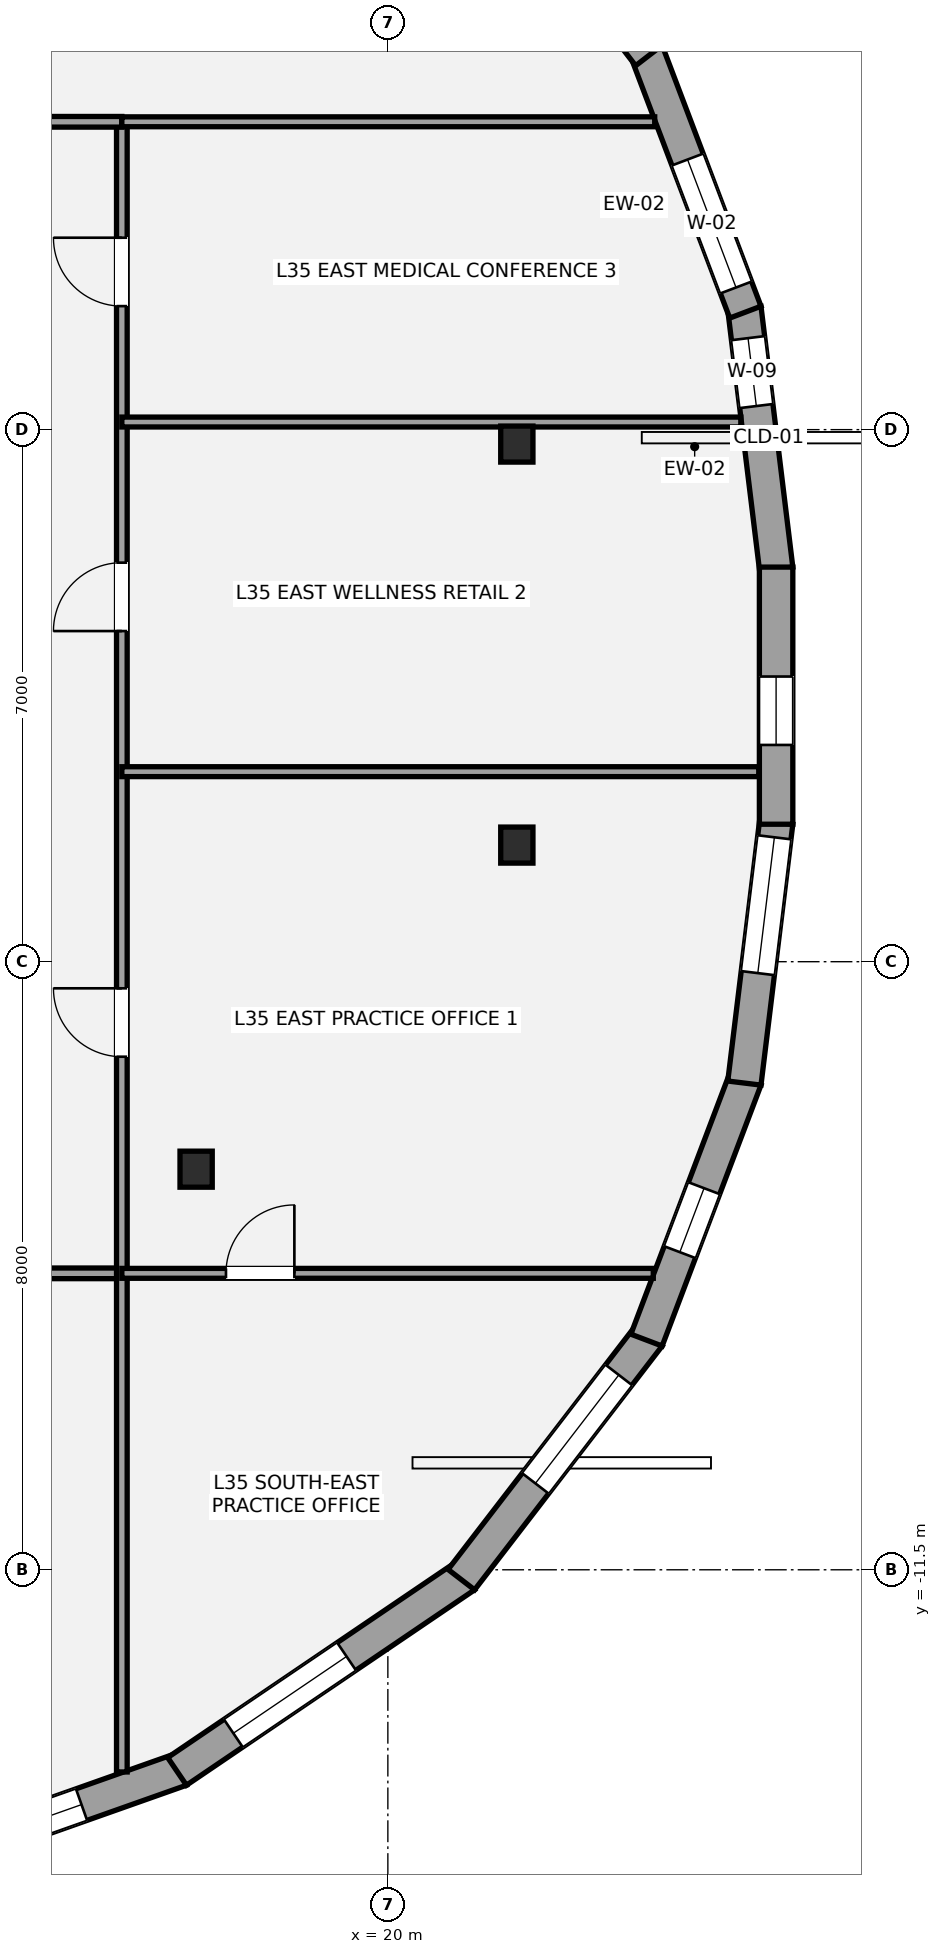
"""IFC4 building model, lengths in metres.
Left out: names, types, materials, properties, quantities, classifications, styles, units other than length and angle.
Written with IfcOpenShell. Run it as: python <this file> out.ifc"""

import sys

from ifc_helpers import new_model, si_unit, direction, frame, frame_2d, origin, origin_2d, place, context, subcontext, project, spatial, rectangle, i_section, extrude, element, fill, save


model = new_model("IFC4")
c1 = context("Model", 3, precision=1e-05, world=origin(), true_north=direction((0.0, 1.0)))
c2 = subcontext(c1, "Body", "Model", "MODEL_VIEW")
j1 = project(units=[si_unit("LENGTHUNIT", "METRE"), si_unit("PLANEANGLEUNIT", "RADIAN")], contexts=[c1])
p1 = place(None, origin())
s1 = spatial("IfcSite", under=j1, at=p1, CompositionType="ELEMENT")
p2 = place(p1, origin())
s2 = spatial("IfcBuilding", under=s1, at=p2, CompositionType="ELEMENT")
p3 = place(p2, frame((0.0, 0.0, 131.6)))
s3 = spatial("IfcBuildingStorey", under=s2, at=p3, CompositionType="ELEMENT", Elevation=131.6)
for number, where, z_axis, x_axis in (
    (1, (21.697, 3.31, 0.0), (0.0, 0.0, 1.0), (1.0, 0.0, 0.0)),
    (2, (17.477, -6.229, 0.0), (0.0, 0.0, 1.0), (1.0, 0.0, 0.0)),
    (3, (21.697, -1.966, 0.0), (0.0, 0.0, 1.0), (1.0, 0.0, 0.0)),
):
    element("IfcColumn", number, at=place(p3, frame(where, z_axis=z_axis, x_axis=x_axis)), inside=s3, PredefinedType="COLUMN", context=c2, shape_type="SweptSolid", body=[
        extrude(i_section(OverallWidth=0.424, OverallDepth=0.474, WebThickness=0.048, FlangeThickness=0.077, at=origin_2d()), origin(), (0.0, 0.0, 1.0), 3.5),
    ])
p4 = place(p3, frame((24.691, 5.097, 0.0), z_axis=(0.0, 0.0, 1.0), x_axis=(0.121105287727, -0.992639667394, 0.0)))
e4 = element("IfcWall", 4, at=p4, inside=s3, PredefinedType="STANDARD", context=c2, shape_type="SweptSolid", body=[
    extrude(rectangle(XDim=3.457, YDim=0.44, at=frame_2d((1.729, 0.0))), origin(), (0.0, 0.0, 1.0), 2.478),
])
p5 = place(p4, frame((0.396, 0.0, 0.58)))
e5 = element("IfcOpeningElement", 5, at=p5, cuts=e4, PredefinedType="OPENING", context=c2, shape_type="SweptSolid", body=[
    extrude(rectangle(XDim=0.9, YDim=1.35, at=frame_2d((0.45, 0.675))), frame((0.0, 0.23, 0.0), z_axis=(0.0, -1.0, 0.0), x_axis=(1.0, 0.0, 0.0)), (0.0, 0.0, 1.0), 0.46),
])
p6 = place(p3, frame((23.403, 8.478, 0.0), z_axis=(0.0, 0.0, 1.0), x_axis=(0.354219131363, -0.935162449511, 0.0)))
e6 = element("IfcWall", 6, at=p6, inside=s3, PredefinedType="STANDARD", context=c2, shape_type="SweptSolid", body=[
    extrude(rectangle(XDim=3.671, YDim=0.44, at=frame_2d((1.835, 0.0))), origin(), (0.0, 0.0, 1.0), 2.478),
])
p7 = place(p6, frame((1.524, 0.0, 0.65)))
e7 = element("IfcOpeningElement", 7, at=p7, cuts=e6, PredefinedType="OPENING", context=c2, shape_type="SweptSolid", body=[
    extrude(rectangle(XDim=1.8, YDim=1.7, at=frame_2d((0.9, 0.85))), frame((0.0, 0.23, 0.0), z_axis=(0.0, -1.0, 0.0), x_axis=(1.0, 0.0, 0.0)), (0.0, 0.0, 1.0), 0.46),
])
p8 = place(p3, frame((20.967, 11.63, 0.0), z_axis=(0.0, 0.0, 1.0), x_axis=(0.60975157382, -0.792592592839, 0.0)))
e8 = element("IfcWall", 8, at=p8, inside=s3, PredefinedType="STANDARD", context=c2, shape_type="SweptSolid", body=[
    extrude(rectangle(XDim=4.047, YDim=0.44, at=frame_2d((2.023, 0.0))), origin(), (0.0, 0.0, 1.0), 2.482),
])
p9 = place(p8, frame((0.599, 0.0, 0.65)))
e9 = element("IfcOpeningElement", 9, at=p9, cuts=e8, PredefinedType="OPENING", context=c2, shape_type="SweptSolid", body=[
    extrude(rectangle(XDim=1.8, YDim=1.7, at=frame_2d((0.9, 0.85))), frame((0.0, 0.23, 0.0), z_axis=(0.0, -1.0, 0.0), x_axis=(1.0, 0.0, 0.0)), (0.0, 0.0, 1.0), 0.46),
])
p10 = place(p3, frame((17.277, -14.127, 0.0), z_axis=(0.0, 0.0, 1.0), x_axis=(-0.942780868171, -0.333413009061, 0.0)))
e10 = element("IfcWall", 10, at=p10, inside=s3, PredefinedType="STANDARD", context=c2, shape_type="SweptSolid", body=[
    extrude(rectangle(XDim=5.018, YDim=0.44, at=frame_2d((2.509, 0.0))), origin(), (0.0, 0.0, 1.0), 2.478),
])
p11 = place(p10, frame((1.387, 0.0, 0.65)))
e11 = element("IfcOpeningElement", 11, at=p11, cuts=e10, PredefinedType="OPENING", context=c2, shape_type="SweptSolid", body=[
    extrude(rectangle(XDim=1.8, YDim=1.7, at=frame_2d((0.9, 0.85))), frame((0.0, 0.23, 0.0), z_axis=(0.0, -1.0, 0.0), x_axis=(1.0, 0.0, 0.0)), (0.0, 0.0, 1.0), 0.46),
])
p12 = place(p3, frame((21.018, -11.582, 0.0), z_axis=(0.0, 0.0, 1.0), x_axis=(-0.827670311179, -0.561214625605, 0.0)))
e12 = element("IfcWall", 12, at=p12, inside=s3, PredefinedType="STANDARD", context=c2, shape_type="SweptSolid", body=[
    extrude(rectangle(XDim=4.58, YDim=0.44, at=frame_2d((2.29, 0.0))), origin(), (0.0, 0.0, 1.0), 2.482),
])
p13 = place(p12, frame((1.886, 0.0, 0.65)))
e13 = element("IfcOpeningElement", 13, at=p13, cuts=e12, PredefinedType="OPENING", context=c2, shape_type="SweptSolid", body=[
    extrude(rectangle(XDim=1.8, YDim=1.7, at=frame_2d((0.9, 0.85))), frame((0.0, 0.23, 0.0), z_axis=(0.0, -1.0, 0.0), x_axis=(1.0, 0.0, 0.0)), (0.0, 0.0, 1.0), 0.46),
])
p14 = place(p3, frame((23.435, -8.422, 0.0), z_axis=(0.0, 0.0, 1.0), x_axis=(-0.60975157382, -0.792592592839, 0.0)))
e14 = element("IfcWall", 14, at=p14, inside=s3, PredefinedType="STANDARD", context=c2, shape_type="SweptSolid", body=[
    extrude(rectangle(XDim=4.047, YDim=0.44, at=frame_2d((2.023, 0.0))), origin(), (0.0, 0.0, 1.0), 2.482),
])
p15 = place(p14, frame((0.649, 0.0, 0.65)))
e15 = element("IfcOpeningElement", 15, at=p15, cuts=e14, PredefinedType="OPENING", context=c2, shape_type="SweptSolid", body=[
    extrude(rectangle(XDim=1.8, YDim=1.7, at=frame_2d((0.9, 0.85))), frame((0.0, 0.23, 0.0), z_axis=(0.0, -1.0, 0.0), x_axis=(1.0, 0.0, 0.0)), (0.0, 0.0, 1.0), 0.46),
])
p16 = place(p3, frame((24.704, -5.045, 0.0), z_axis=(0.0, 0.0, 1.0), x_axis=(-0.354219131363, -0.935162449511, 0.0)))
e16 = element("IfcWall", 16, at=p16, inside=s3, PredefinedType="STANDARD", context=c2, shape_type="SweptSolid", body=[
    extrude(rectangle(XDim=3.671, YDim=0.44, at=frame_2d((1.835, 0.0))), origin(), (0.0, 0.0, 1.0), 2.478),
])
p17 = place(p16, frame((1.534, 0.0, 0.58)))
e17 = element("IfcOpeningElement", 17, at=p17, cuts=e16, PredefinedType="OPENING", context=c2, shape_type="SweptSolid", body=[
    extrude(rectangle(XDim=0.9, YDim=1.35, at=frame_2d((0.45, 0.675))), frame((0.0, 0.23, 0.0), z_axis=(0.0, -1.0, 0.0), x_axis=(1.0, 0.0, 0.0)), (0.0, 0.0, 1.0), 0.46),
])
p18 = place(p3, frame((25.11, -1.665, 0.0), z_axis=(0.0, 0.0, 1.0), x_axis=(-0.121105287727, -0.992639667394, 0.0)))
e18 = element("IfcWall", 18, at=p18, inside=s3, PredefinedType="STANDARD", context=c2, shape_type="SweptSolid", body=[
    extrude(rectangle(XDim=3.457, YDim=0.44, at=frame_2d((1.729, 0.0))), origin(), (0.0, 0.0, 1.0), 2.478),
])
p19 = place(p18, frame((0.2, 0.0, 0.65)))
e19 = element("IfcOpeningElement", 19, at=p19, cuts=e18, PredefinedType="OPENING", context=c2, shape_type="SweptSolid", body=[
    extrude(rectangle(XDim=1.8, YDim=1.7, at=frame_2d((0.9, 0.85))), frame((0.0, 0.23, 0.0), z_axis=(0.0, -1.0, 0.0), x_axis=(1.0, 0.0, 0.0)), (0.0, 0.0, 1.0), 0.46),
])
p20 = place(p3, frame((25.108, 1.691, 0.0), z_axis=(0.0, 0.0, 1.0), x_axis=(0.0, -1.0, 0.0)))
e20 = element("IfcWall", 20, at=p20, inside=s3, PredefinedType="STANDARD", context=c2, shape_type="SweptSolid", body=[
    extrude(rectangle(XDim=3.383, YDim=0.44, at=frame_2d((1.691, 0.0))), origin(), (0.0, 0.0, 1.0), 2.482),
])
p21 = place(p20, frame((1.44, 0.0, 0.58)))
e21 = element("IfcOpeningElement", 21, at=p21, cuts=e20, PredefinedType="OPENING", context=c2, shape_type="SweptSolid", body=[
    extrude(rectangle(XDim=0.9, YDim=1.35, at=frame_2d((0.45, 0.675))), frame((0.0, 0.23, 0.0), z_axis=(0.0, -1.0, 0.0), x_axis=(1.0, 0.0, 0.0)), (0.0, 0.0, 1.0), 0.46),
])
p22 = place(p3, frame((-15.7, -7.6, 0.0), z_axis=(0.0, 0.0, 1.0), x_axis=(1.0, 0.0, 0.0)))
e22 = element("IfcWall", 22, at=p22, inside=s3, PredefinedType="PARTITIONING", context=c2, shape_type="SweptSolid", body=[
    extrude(rectangle(XDim=32.2, YDim=0.14, at=frame_2d((16.1, 0.0))), origin(), (0.0, 0.0, 1.0), 2.638),
])
p23 = place(p22, frame((5.9, 0.0, 0.0)))
e23 = element("IfcOpeningElement", 23, at=p23, cuts=e22, PredefinedType="OPENING", context=c2, shape_type="SweptSolid", body=[
    extrude(rectangle(XDim=0.9, YDim=2.1, at=frame_2d((0.45, 1.05))), frame((0.0, 0.08, 0.0), z_axis=(0.0, -1.0, 0.0), x_axis=(1.0, 0.0, 0.0)), (0.0, 0.0, 1.0), 0.16),
])
p24 = place(p22, frame((16.5, 0.0, 0.0)))
e24 = element("IfcOpeningElement", 24, at=p24, cuts=e22, PredefinedType="OPENING", context=c2, shape_type="SweptSolid", body=[
    extrude(rectangle(XDim=0.9, YDim=2.1, at=frame_2d((0.45, 1.05))), frame((0.0, 0.08, 0.0), z_axis=(0.0, -1.0, 0.0), x_axis=(1.0, 0.0, 0.0)), (0.0, 0.0, 1.0), 0.16),
])
p25 = place(p22, frame((26.25, 0.0, 0.0)))
e25 = element("IfcOpeningElement", 25, at=p25, cuts=e22, PredefinedType="OPENING", context=c2, shape_type="SweptSolid", body=[
    extrude(rectangle(XDim=0.9, YDim=2.1, at=frame_2d((0.45, 1.05))), frame((0.0, 0.08, 0.0), z_axis=(0.0, -1.0, 0.0), x_axis=(1.0, 0.0, 0.0)), (0.0, 0.0, 1.0), 0.16),
])
p26 = place(p3, frame((16.5, -14.16, 0.0), z_axis=(0.0, 0.0, 1.0), x_axis=(0.0, 1.0, 0.0)))
e26 = element("IfcWall", 26, at=p26, inside=s3, PredefinedType="PARTITIONING", context=c2, shape_type="SweptSolid", body=[
    extrude(rectangle(XDim=21.71, YDim=0.14, at=frame_2d((10.855, 0.0))), origin(), (0.0, 0.0, 1.0), 2.713),
])
p27 = place(p26, frame((9.41, 0.0, 0.0)))
e27 = element("IfcOpeningElement", 27, at=p27, cuts=e26, PredefinedType="OPENING", context=c2, shape_type="SweptSolid", body=[
    extrude(rectangle(XDim=0.9, YDim=2.1, at=frame_2d((0.45, 1.05))), frame((0.0, 0.08, 0.0), z_axis=(0.0, -1.0, 0.0), x_axis=(1.0, 0.0, 0.0)), (0.0, 0.0, 1.0), 0.16),
])
p28 = place(p26, frame((15.01, 0.0, 0.0)))
e28 = element("IfcOpeningElement", 28, at=p28, cuts=e26, PredefinedType="OPENING", context=c2, shape_type="SweptSolid", body=[
    extrude(rectangle(XDim=0.9, YDim=2.1, at=frame_2d((0.45, 1.05))), frame((0.0, 0.08, 0.0), z_axis=(0.0, -1.0, 0.0), x_axis=(1.0, 0.0, 0.0)), (0.0, 0.0, 1.0), 0.16),
])
p29 = place(p26, frame((19.285, 0.0, 0.0)))
e29 = element("IfcOpeningElement", 29, at=p29, cuts=e26, PredefinedType="OPENING", context=c2, shape_type="SweptSolid", body=[
    extrude(rectangle(XDim=0.9, YDim=2.1, at=frame_2d((0.45, 1.05))), frame((0.0, 0.08, 0.0), z_axis=(0.0, -1.0, 0.0), x_axis=(1.0, 0.0, 0.0)), (0.0, 0.0, 1.0), 0.16),
])
p30 = place(p3, frame((13.9, 7.55, 0.0), z_axis=(0.0, 0.0, 1.0), x_axis=(1.0, 0.0, 0.0)))
e30 = element("IfcWall", 30, at=p30, inside=s3, PredefinedType="PARTITIONING", context=c2, shape_type="SweptSolid", body=[
    extrude(rectangle(XDim=2.6, YDim=0.14, at=frame_2d((1.3, 0.0))), origin(), (0.0, 0.0, 1.0), 2.713),
])
p31 = place(p30, frame((0.32, 0.0, 0.0)))
e31 = element("IfcOpeningElement", 31, at=p31, cuts=e30, PredefinedType="OPENING", context=c2, shape_type="SweptSolid", body=[
    extrude(rectangle(XDim=0.92, YDim=2.15, at=frame_2d((0.46, 1.075))), frame((0.0, 0.08, 0.0), z_axis=(0.0, -1.0, 0.0), x_axis=(1.0, 0.0, 0.0)), (0.0, 0.0, 1.0), 0.16),
])
p32 = place(p3, frame((16.5, 7.55, 0.0), z_axis=(0.0, 0.0, 1.0), x_axis=(1.0, 0.0, 0.0)))
e32 = element("IfcWall", 32, at=p32, inside=s3, PredefinedType="PARTITIONING", context=c2, shape_type="SweptSolid", body=[
    extrude(rectangle(XDim=7.011, YDim=0.13, at=frame_2d((3.505, 0.0))), origin(), (0.0, 0.0, 1.0), 2.713),
])
p33 = place(p3, frame((16.5, -7.6, 0.0), z_axis=(0.0, 0.0, 1.0), x_axis=(1.0, 0.0, 0.0)))
e33 = element("IfcWall", 33, at=p33, inside=s3, PredefinedType="PARTITIONING", context=c2, shape_type="SweptSolid", body=[
    extrude(rectangle(XDim=6.992, YDim=0.13, at=frame_2d((3.496, 0.0))), origin(), (0.0, 0.0, 1.0), 2.713),
])
p34 = place(p33, frame((1.37, 0.0, 0.0)))
e34 = element("IfcOpeningElement", 34, at=p34, cuts=e33, PredefinedType="OPENING", context=c2, shape_type="SweptSolid", body=[
    extrude(rectangle(XDim=0.9, YDim=2.1, at=frame_2d((0.45, 1.05))), frame((0.0, 0.075, 0.0), z_axis=(0.0, -1.0, 0.0), x_axis=(1.0, 0.0, 0.0)), (0.0, 0.0, 1.0), 0.15),
])
p35 = place(p3, frame((16.5, -1.0, 0.0), z_axis=(0.0, 0.0, 1.0), x_axis=(1.0, 0.0, 0.0)))
e35 = element("IfcWall", 35, at=p35, inside=s3, PredefinedType="PARTITIONING", context=c2, shape_type="SweptSolid", body=[
    extrude(rectangle(XDim=8.38, YDim=0.13, at=frame_2d((4.19, 0.0))), origin(), (0.0, 0.0, 1.0), 2.713),
])
p36 = place(p3, frame((16.5, 3.6, 0.0), z_axis=(0.0, 0.0, 1.0), x_axis=(1.0, 0.0, 0.0)))
e36 = element("IfcWall", 36, at=p36, inside=s3, PredefinedType="PARTITIONING", context=c2, shape_type="SweptSolid", body=[
    extrude(rectangle(XDim=8.144, YDim=0.13, at=frame_2d((4.072, 0.0))), origin(), (0.0, 0.0, 1.0), 2.713),
])
p37 = place(p5, origin())
e37 = element("IfcWindow", 37, at=p37, inside=s3, PartitioningType="SINGLE_PANEL", PredefinedType="WINDOW", context=c2, shape_type="SweptSolid", body=[
    extrude(rectangle(XDim=0.9, YDim=1.35, at=frame_2d((0.45, 0.675))), frame((0.0, -0.01, 0.0), z_axis=(0.0, -1.0, 0.0), x_axis=(1.0, 0.0, 0.0)), (0.0, 0.0, 1.0), 0.06),
])
fill(e5, e37)
p38 = place(p7, origin())
e38 = element("IfcWindow", 38, at=p38, inside=s3, PartitioningType="SINGLE_PANEL", PredefinedType="WINDOW", context=c2, shape_type="SweptSolid", body=[
    extrude(rectangle(XDim=1.8, YDim=1.7, at=frame_2d((0.9, 0.85))), frame((0.0, -0.01, 0.0), z_axis=(0.0, -1.0, 0.0), x_axis=(1.0, 0.0, 0.0)), (0.0, 0.0, 1.0), 0.06),
])
fill(e7, e38)
p39 = place(p11, origin())
e39 = element("IfcWindow", 39, at=p39, inside=s3, PartitioningType="SINGLE_PANEL", PredefinedType="WINDOW", context=c2, shape_type="SweptSolid", body=[
    extrude(rectangle(XDim=1.8, YDim=1.7, at=frame_2d((0.9, 0.85))), frame((0.0, -0.01, 0.0), z_axis=(0.0, -1.0, 0.0), x_axis=(1.0, 0.0, 0.0)), (0.0, 0.0, 1.0), 0.06),
])
fill(e11, e39)
p40 = place(p13, origin())
e40 = element("IfcWindow", 40, at=p40, inside=s3, PartitioningType="SINGLE_PANEL", PredefinedType="WINDOW", context=c2, shape_type="SweptSolid", body=[
    extrude(rectangle(XDim=1.8, YDim=1.7, at=frame_2d((0.9, 0.85))), frame((0.0, -0.01, 0.0), z_axis=(0.0, -1.0, 0.0), x_axis=(1.0, 0.0, 0.0)), (0.0, 0.0, 1.0), 0.06),
])
fill(e13, e40)
p41 = place(p15, origin())
e41 = element("IfcWindow", 41, at=p41, inside=s3, PartitioningType="SINGLE_PANEL", PredefinedType="WINDOW", context=c2, shape_type="SweptSolid", body=[
    extrude(rectangle(XDim=1.8, YDim=1.7, at=frame_2d((0.9, 0.85))), frame((0.0, -0.01, 0.0), z_axis=(0.0, -1.0, 0.0), x_axis=(1.0, 0.0, 0.0)), (0.0, 0.0, 1.0), 0.06),
])
fill(e15, e41)
p42 = place(p17, origin())
e42 = element("IfcWindow", 42, at=p42, inside=s3, PartitioningType="SINGLE_PANEL", PredefinedType="WINDOW", context=c2, shape_type="SweptSolid", body=[
    extrude(rectangle(XDim=0.9, YDim=1.35, at=frame_2d((0.45, 0.675))), frame((0.0, -0.01, 0.0), z_axis=(0.0, -1.0, 0.0), x_axis=(1.0, 0.0, 0.0)), (0.0, 0.0, 1.0), 0.06),
])
fill(e17, e42)
p43 = place(p19, origin())
e43 = element("IfcWindow", 43, at=p43, inside=s3, PartitioningType="SINGLE_PANEL", PredefinedType="WINDOW", context=c2, shape_type="SweptSolid", body=[
    extrude(rectangle(XDim=1.8, YDim=1.7, at=frame_2d((0.9, 0.85))), frame((0.0, -0.01, 0.0), z_axis=(0.0, -1.0, 0.0), x_axis=(1.0, 0.0, 0.0)), (0.0, 0.0, 1.0), 0.06),
])
fill(e19, e43)
p44 = place(p21, origin())
e44 = element("IfcWindow", 44, at=p44, inside=s3, PartitioningType="SINGLE_PANEL", PredefinedType="WINDOW", context=c2, shape_type="SweptSolid", body=[
    extrude(rectangle(XDim=0.9, YDim=1.35, at=frame_2d((0.45, 0.675))), frame((0.0, -0.01, 0.0), z_axis=(0.0, -1.0, 0.0), x_axis=(1.0, 0.0, 0.0)), (0.0, 0.0, 1.0), 0.06),
])
fill(e21, e44)
p45 = place(p34, origin())
e45 = element("IfcDoor", 45, at=p45, inside=s3, OperationType="SINGLE_SWING_RIGHT", PredefinedType="DOOR", context=c2, shape_type="SweptSolid", body=[
    extrude(rectangle(XDim=0.9, YDim=2.1, at=frame_2d((0.45, 1.05))), frame((0.0, 0.025, 0.0), z_axis=(0.0, -1.0, 0.0), x_axis=(1.0, 0.0, 0.0)), (0.0, 0.0, 1.0), 0.05),
])
fill(e34, e45)
p46 = place(p27, origin())
e46 = element("IfcDoor", 46, at=p46, inside=s3, OperationType="SINGLE_SWING_RIGHT", PredefinedType="DOOR", context=c2, shape_type="SweptSolid", body=[
    extrude(rectangle(XDim=0.9, YDim=2.1, at=frame_2d((0.45, 1.05))), frame((0.0, 0.025, 0.0), z_axis=(0.0, -1.0, 0.0), x_axis=(1.0, 0.0, 0.0)), (0.0, 0.0, 1.0), 0.05),
])
fill(e27, e46)
p47 = place(p28, origin())
e47 = element("IfcDoor", 47, at=p47, inside=s3, OperationType="SINGLE_SWING_LEFT", PredefinedType="DOOR", context=c2, shape_type="SweptSolid", body=[
    extrude(rectangle(XDim=0.9, YDim=2.1, at=frame_2d((0.45, 1.05))), frame((0.0, 0.025, 0.0), z_axis=(0.0, -1.0, 0.0), x_axis=(1.0, 0.0, 0.0)), (0.0, 0.0, 1.0), 0.05),
])
fill(e28, e47)
p48 = place(p29, origin())
e48 = element("IfcDoor", 48, at=p48, inside=s3, OperationType="SINGLE_SWING_RIGHT", PredefinedType="DOOR", context=c2, shape_type="SweptSolid", body=[
    extrude(rectangle(XDim=0.9, YDim=2.1, at=frame_2d((0.45, 1.05))), frame((0.0, 0.025, 0.0), z_axis=(0.0, -1.0, 0.0), x_axis=(1.0, 0.0, 0.0)), (0.0, 0.0, 1.0), 0.05),
])
fill(e29, e48)
save(model, sys.argv[1])
